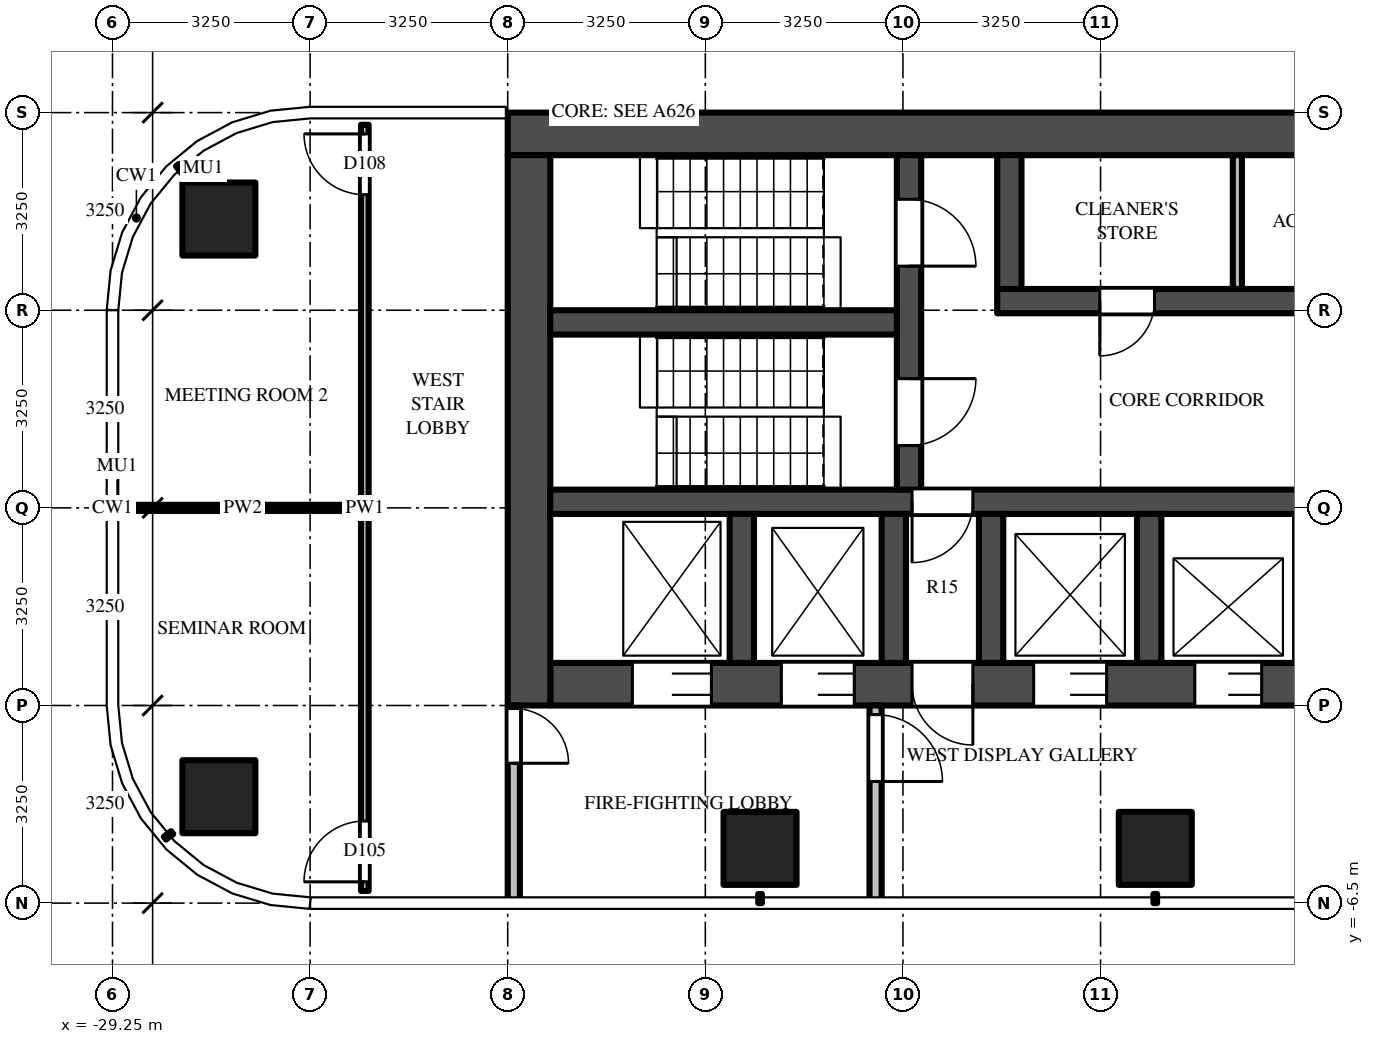
"""IFC4 building model, lengths in metres.
Left out: names, types, materials, properties, quantities, classifications, styles, units other than length and angle.
Written with IfcOpenShell. Run it as: python <this file> out.ifc"""

import sys

from ifc_helpers import new_model, si_unit, direction, frame, frame_2d, origin, origin_2d, place, context, subcontext, project, spatial, polyline, rectangle, outline, extrude, source, transform, mapped, element, fill, save


model = new_model("IFC4")
c1 = context("Model", 3, precision=1e-05, world=origin(), true_north=direction((0.0, 1.0)))
c2 = subcontext(c1, "Body", "Model", "MODEL_VIEW")
j1 = project(units=[si_unit("LENGTHUNIT", "METRE"), si_unit("PLANEANGLEUNIT", "RADIAN")], contexts=[c1])
p1 = place(None, origin())
s1 = spatial("IfcSite", under=j1, at=p1, CompositionType="ELEMENT")
p2 = place(p1, origin())
s2 = spatial("IfcBuilding", under=s1, at=p2, CompositionType="ELEMENT")
p3 = place(p2, frame((0.0, 0.0, 208.8)))
s3 = spatial("IfcBuildingStorey", under=s2, at=p3, CompositionType="ELEMENT", Elevation=208.8)
m1 = source(origin(), c2, "Body", "SweptSolid", [
    extrude(rectangle(XDim=1.2, YDim=1.2, at=origin_2d()), origin(), (0.0, 0.0, 1.0), 3.9),
])
for number, where, z_axis, x_axis in (
    (1, (-12.1, -5.6, 0.0), (0.0, 0.0, 1.0), (1.0, 0.0, 0.0)),
    (2, (-18.6, -5.6, 0.0), (0.0, 0.0, 1.0), (1.0, 0.0, 0.0)),
    (3, (-27.5, -4.75, 0.0), (0.0, 0.0, 1.0), (1.0, 0.0, 0.0)),
    (4, (-27.5, 4.75, 0.0), (0.0, 0.0, 1.0), (1.0, 0.0, 0.0)),
):
    element("IfcColumn", number, at=place(p3, frame(where, z_axis=z_axis, x_axis=x_axis)), inside=s3, PredefinedType="COLUMN", context=c2, shape_type="MappedRepresentation", body=[
        mapped(m1, transform((0.0, 0.0, 0.0))),
    ])
m2 = source(origin(), c2, "Body", "SweptSolid", [
    extrude(rectangle(XDim=16.55, YDim=0.7, at=frame_2d((8.275, 0.0))), origin(), (0.0, 0.0, 1.0), 3.45),
])
p4 = place(p3, frame((-6.2, 6.15, 0.0), z_axis=(0.0, 0.0, 1.0), x_axis=(-1.0, 0.0, 0.0)))
e5 = element("IfcWall", 5, at=p4, inside=s3, PredefinedType="SHEAR", context=c2, shape_type="MappedRepresentation", body=[
    mapped(m2, transform((0.0, 0.0, 0.0))),
])
m3 = source(origin(), c2, "Body", "SweptSolid", [
    extrude(rectangle(XDim=14.85, YDim=0.7, at=frame_2d((7.425, 0.0))), origin(), (0.0, 0.0, 1.0), 3.45),
])
p5 = place(p3, frame((-7.2, -2.9, 0.0), z_axis=(0.0, 0.0, 1.0), x_axis=(-1.0, 0.0, 0.0)))
e6 = element("IfcWall", 6, at=p5, inside=s3, PredefinedType="SHEAR", context=c2, shape_type="MappedRepresentation", body=[
    mapped(m3, transform((0.0, 0.0, 0.0))),
])
m4 = source(origin(), c2, "Body", "SweptSolid", [
    extrude(rectangle(XDim=1.1, YDim=2.1, at=frame_2d((0.55, 1.05))), frame((0.0, 0.36, 0.0), z_axis=(0.0, -1.0, 0.0), x_axis=(1.0, 0.0, 0.0)), (0.0, 0.0, 1.0), 0.72),
])
p6 = place(p5, frame((0.55, 0.0, 0.0)))
e7 = element("IfcOpeningElement", 7, at=p6, cuts=e6, PredefinedType="OPENING", context=c2, shape_type="MappedRepresentation", body=[
    mapped(m4, transform((0.0, 0.0, 0.0))),
])
p7 = place(p5, frame((3.15, 0.0, 0.0)))
e8 = element("IfcOpeningElement", 8, at=p7, cuts=e6, PredefinedType="OPENING", context=c2, shape_type="MappedRepresentation", body=[
    mapped(m4, transform((0.0, 0.0, 0.0))),
])
m5 = source(origin(), c2, "Body", "SweptSolid", [
    extrude(rectangle(XDim=1.2, YDim=2.1, at=frame_2d((0.6, 1.05))), frame((0.0, 0.36, 0.0), z_axis=(0.0, -1.0, 0.0), x_axis=(1.0, 0.0, 0.0)), (0.0, 0.0, 1.0), 0.72),
])
p8 = place(p5, frame((5.7, 0.0, 0.0)))
e9 = element("IfcOpeningElement", 9, at=p8, cuts=e6, PredefinedType="OPENING", context=c2, shape_type="MappedRepresentation", body=[
    mapped(m5, transform((0.0, 0.0, 0.0))),
])
m6 = source(origin(), c2, "Body", "SweptSolid", [
    extrude(rectangle(XDim=1.3, YDim=2.1, at=frame_2d((0.65, 1.05))), frame((0.0, 0.36, 0.0), z_axis=(0.0, -1.0, 0.0), x_axis=(1.0, 0.0, 0.0)), (0.0, 0.0, 1.0), 0.72),
])
p9 = place(p5, frame((12.2, 0.0, 0.0)))
e10 = element("IfcOpeningElement", 10, at=p9, cuts=e6, PredefinedType="OPENING", context=c2, shape_type="MappedRepresentation", body=[
    mapped(m6, transform((0.0, 0.0, 0.0))),
])
p10 = place(p5, frame((9.85, 0.0, 0.0)))
e11 = element("IfcOpeningElement", 11, at=p10, cuts=e6, PredefinedType="OPENING", context=c2, shape_type="MappedRepresentation", body=[
    mapped(m5, transform((0.0, 0.0, 0.0))),
])
m7 = source(origin(), c2, "Body", "SweptSolid", [
    extrude(rectangle(XDim=1.0, YDim=2.1, at=frame_2d((0.5, 1.05))), frame((0.0, 0.36, 0.0), z_axis=(0.0, -1.0, 0.0), x_axis=(1.0, 0.0, 0.0)), (0.0, 0.0, 1.0), 0.72),
])
p11 = place(p5, frame((7.9, 0.0, 0.0)))
e12 = element("IfcOpeningElement", 12, at=p11, cuts=e6, PredefinedType="OPENING", context=c2, shape_type="MappedRepresentation", body=[
    mapped(m7, transform((0.0, 0.0, 0.0))),
])
m8 = source(origin(), c2, "Body", "SweptSolid", [
    extrude(rectangle(XDim=9.05, YDim=0.7, at=frame_2d((4.525, 0.0))), origin(), (0.0, 0.0, 1.0), 3.45),
])
p12 = place(p3, frame((-22.4, 5.8, 0.0), z_axis=(0.0, 0.0, 1.0), x_axis=(0.0, -1.0, 0.0)))
e13 = element("IfcWall", 13, at=p12, inside=s3, PredefinedType="SHEAR", context=c2, shape_type="MappedRepresentation", body=[
    mapped(m8, transform((0.0, 0.0, 0.0))),
])
m9 = source(origin(), c2, "Body", "SweptSolid", [
    extrude(rectangle(XDim=7.5, YDim=0.4, at=frame_2d((3.75, 0.0))), origin(), (0.0, 0.0, 1.0), 3.45),
])
p13 = place(p3, frame((-7.2, 3.4, 0.0), z_axis=(0.0, 0.0, 1.0), x_axis=(-1.0, 0.0, 0.0)))
e14 = element("IfcWall", 14, at=p13, inside=s3, PredefinedType="SHEAR", context=c2, shape_type="MappedRepresentation", body=[
    mapped(m9, transform((0.0, 0.0, 0.0))),
])
m10 = source(origin(), c2, "Body", "SweptSolid", [
    extrude(rectangle(XDim=1.0, YDim=2.1, at=frame_2d((0.5, 1.05))), frame((0.0, 0.21, 0.0), z_axis=(0.0, -1.0, 0.0), x_axis=(1.0, 0.0, 0.0)), (0.0, 0.0, 1.0), 0.42),
])
p14 = place(p13, frame((1.238, 0.0, 0.0)))
e15 = element("IfcOpeningElement", 15, at=p14, cuts=e14, PredefinedType="OPENING", context=c2, shape_type="MappedRepresentation", body=[
    mapped(m10, transform((0.0, 0.0, 0.0))),
])
m11 = source(origin(), c2, "Body", "SweptSolid", [
    extrude(rectangle(XDim=0.9, YDim=2.1, at=frame_2d((0.45, 1.05))), frame((0.0, 0.21, 0.0), z_axis=(0.0, -1.0, 0.0), x_axis=(1.0, 0.0, 0.0)), (0.0, 0.0, 1.0), 0.42),
])
p15 = place(p13, frame((4.913, 0.0, 0.0)))
e16 = element("IfcOpeningElement", 16, at=p15, cuts=e14, PredefinedType="OPENING", context=c2, shape_type="MappedRepresentation", body=[
    mapped(m11, transform((0.0, 0.0, 0.0))),
])
m12 = source(origin(), c2, "Body", "SweptSolid", [
    extrude(rectangle(XDim=14.85, YDim=0.4, at=frame_2d((7.425, 0.0))), origin(), (0.0, 0.0, 1.0), 3.45),
])
p16 = place(p3, frame((-7.2, 0.1, 0.0), z_axis=(0.0, 0.0, 1.0), x_axis=(-1.0, 0.0, 0.0)))
e17 = element("IfcWall", 17, at=p16, inside=s3, PredefinedType="SHEAR", context=c2, shape_type="MappedRepresentation", body=[
    mapped(m12, transform((0.0, 0.0, 0.0))),
])
p17 = place(p16, frame((7.9, 0.0, 0.0)))
e18 = element("IfcOpeningElement", 18, at=p17, cuts=e17, PredefinedType="OPENING", context=c2, shape_type="MappedRepresentation", body=[
    mapped(m10, transform((0.0, 0.0, 0.0))),
])
m13 = source(origin(), c2, "Body", "SweptSolid", [
    extrude(rectangle(XDim=5.5, YDim=0.4, at=frame_2d((2.75, 0.0))), origin(), (0.0, 0.0, 1.0), 3.45),
])
p18 = place(p3, frame((-16.15, 5.8, 0.0), z_axis=(0.0, 0.0, 1.0), x_axis=(0.0, -1.0, 0.0)))
e19 = element("IfcWall", 19, at=p18, inside=s3, PredefinedType="SHEAR", context=c2, shape_type="MappedRepresentation", body=[
    mapped(m13, transform((0.0, 0.0, 0.0))),
])
m14 = source(origin(), c2, "Body", "SweptSolid", [
    extrude(rectangle(XDim=1.1, YDim=2.1, at=frame_2d((0.55, 1.05))), frame((0.0, 0.21, 0.0), z_axis=(0.0, -1.0, 0.0), x_axis=(1.0, 0.0, 0.0)), (0.0, 0.0, 1.0), 0.42),
])
p19 = place(p18, frame((0.725, 0.0, 0.0)))
e20 = element("IfcOpeningElement", 20, at=p19, cuts=e19, PredefinedType="OPENING", context=c2, shape_type="MappedRepresentation", body=[
    mapped(m14, transform((0.0, 0.0, 0.0))),
])
p20 = place(p18, frame((3.675, 0.0, 0.0)))
e21 = element("IfcOpeningElement", 21, at=p20, cuts=e19, PredefinedType="OPENING", context=c2, shape_type="MappedRepresentation", body=[
    mapped(m14, transform((0.0, 0.0, 0.0))),
])
m15 = source(origin(), c2, "Body", "SweptSolid", [
    extrude(rectangle(XDim=5.7, YDim=0.4, at=frame_2d((2.85, 0.0))), origin(), (0.0, 0.0, 1.0), 3.45),
])
p21 = place(p3, frame((-16.35, 3.05, 0.0), z_axis=(0.0, 0.0, 1.0), x_axis=(-1.0, 0.0, 0.0)))
e22 = element("IfcWall", 22, at=p21, inside=s3, PredefinedType="SHEAR", context=c2, shape_type="MappedRepresentation", body=[
    mapped(m15, transform((0.0, 0.0, 0.0))),
])
m16 = source(origin(), c2, "Body", "SweptSolid", [
    extrude(rectangle(XDim=2.2, YDim=0.4, at=frame_2d((1.1, 0.0))), origin(), (0.0, 0.0, 1.0), 3.45),
])
p22 = place(p3, frame((-14.5, 5.8, 0.0), z_axis=(0.0, 0.0, 1.0), x_axis=(0.0, -1.0, 0.0)))
e23 = element("IfcWall", 23, at=p22, inside=s3, PredefinedType="SHEAR", context=c2, shape_type="MappedRepresentation", body=[
    mapped(m16, transform((0.0, 0.0, 0.0))),
])
m17 = source(origin(), c2, "Body", "SweptSolid", [
    extrude(rectangle(XDim=2.45, YDim=0.4, at=frame_2d((1.225, 0.0))), origin(), (0.0, 0.0, 1.0), 3.45),
])
for number, where, z_axis, x_axis in (
    (24, (-12.2, -0.1, 0.0), (0.0, 0.0, 1.0), (0.0, -1.0, 0.0)),
    (25, (-14.8, -0.1, 0.0), (0.0, 0.0, 1.0), (0.0, -1.0, 0.0)),
    (26, (-16.4, -0.1, 0.0), (0.0, 0.0, 1.0), (0.0, -1.0, 0.0)),
    (27, (-18.9, -0.1, 0.0), (0.0, 0.0, 1.0), (0.0, -1.0, 0.0)),
):
    element("IfcWall", number, at=place(p3, frame(where, z_axis=z_axis, x_axis=x_axis)), inside=s3, PredefinedType="SHEAR", context=c2, shape_type="MappedRepresentation", body=[
        mapped(m17, transform((0.0, 0.0, 0.0))),
    ])
m18 = source(origin(), c2, "Body", "SweptSolid", [
    extrude(rectangle(XDim=3.25, YDim=0.2, at=frame_2d((1.625, 0.0))), origin(), (0.0, 0.0, 1.0), 3.45),
])
p23 = place(p3, frame((-16.7, -3.25, 0.0), z_axis=(0.0, 0.0, 1.0), x_axis=(0.0, -1.0, 0.0)))
e28 = element("IfcWall", 28, at=p23, inside=s3, PredefinedType="PARTITIONING", context=c2, shape_type="MappedRepresentation", body=[
    mapped(m18, transform((0.0, 0.0, 0.0))),
])
m19 = source(origin(), c2, "Body", "SweptSolid", [
    extrude(rectangle(XDim=1.1, YDim=2.1, at=frame_2d((0.55, 1.05))), frame((0.0, 0.11, 0.0), z_axis=(0.0, -1.0, 0.0), x_axis=(1.0, 0.0, 0.0)), (0.0, 0.0, 1.0), 0.22),
])
p24 = place(p23, frame((0.15, 0.0, 0.0)))
e29 = element("IfcOpeningElement", 29, at=p24, cuts=e28, PredefinedType="OPENING", context=c2, shape_type="MappedRepresentation", body=[
    mapped(m19, transform((0.0, 0.0, 0.0))),
])
p25 = place(p3, frame((-22.65, -3.25, 0.0), z_axis=(0.0, 0.0, 1.0), x_axis=(0.0, -1.0, 0.0)))
e30 = element("IfcWall", 30, at=p25, inside=s3, PredefinedType="PARTITIONING", context=c2, shape_type="MappedRepresentation", body=[
    mapped(m18, transform((0.0, 0.0, 0.0))),
])
m20 = source(origin(), c2, "Body", "SweptSolid", [
    extrude(rectangle(XDim=0.9, YDim=2.1, at=frame_2d((0.45, 1.05))), frame((0.0, 0.11, 0.0), z_axis=(0.0, -1.0, 0.0), x_axis=(1.0, 0.0, 0.0)), (0.0, 0.0, 1.0), 0.22),
])
p26 = place(p25, frame((0.05, 0.0, 0.0)))
e31 = element("IfcOpeningElement", 31, at=p26, cuts=e30, PredefinedType="OPENING", context=c2, shape_type="MappedRepresentation", body=[
    mapped(m20, transform((0.0, 0.0, 0.0))),
])
m21 = source(origin(), c2, "Body", "SweptSolid", [
    extrude(rectangle(XDim=2.2, YDim=0.15, at=frame_2d((1.1, 0.0))), origin(), (0.0, 0.0, 1.0), 3.45),
])
p27 = place(p3, frame((-10.75, 5.8, 0.0), z_axis=(0.0, 0.0, 1.0), x_axis=(0.0, -1.0, 0.0)))
e32 = element("IfcWall", 32, at=p27, inside=s3, PredefinedType="PARTITIONING", context=c2, shape_type="MappedRepresentation", body=[
    mapped(m21, transform((0.0, 0.0, 0.0))),
])
p28 = place(p3, origin())
e33 = element("IfcWall", 33, at=p28, inside=s3, PredefinedType="USERDEFINED", context=c2, shape_type="SweptSolid", body=[
    extrude(outline(polyline([(-26.967, -8.775), (-28.595, -8.198), (-29.254, -7.586), (-28.846, -7.146), (-28.278, -7.674), (-26.87, -8.173), (-25.765, -8.148), (-25.642, -8.112), (-25.472, -8.688), (-25.672, -8.747), (-26.967, -8.775)])), origin(), (0.0, 0.0, 1.0), 0.5),
])
m22 = source(origin(), c2, "Body", "SweptSolid", [
    extrude(rectangle(XDim=12.6, YDim=0.125, at=frame_2d((6.3, 0.0))), origin(), (0.0, 0.0, 1.0), 2.53),
])
p29 = place(p3, frame((-25.1, -6.3, 0.0), z_axis=(0.0, 0.0, 1.0), x_axis=(0.0, 1.0, 0.0)))
e34 = element("IfcWall", 34, at=p29, inside=s3, PredefinedType="PARTITIONING", context=c2, shape_type="MappedRepresentation", body=[
    mapped(m22, transform((0.0, 0.0, 0.0))),
])
m23 = source(origin(), c2, "Body", "SweptSolid", [
    extrude(rectangle(XDim=1.0, YDim=2.1, at=frame_2d((0.5, 1.05))), frame((0.0, 0.073, 0.0), z_axis=(0.0, -1.0, 0.0), x_axis=(1.0, 0.0, 0.0)), (0.0, 0.0, 1.0), 0.145),
])
p30 = place(p29, frame((0.15, 0.0, 0.0)))
e35 = element("IfcOpeningElement", 35, at=p30, cuts=e34, PredefinedType="OPENING", context=c2, shape_type="MappedRepresentation", body=[
    mapped(m23, transform((0.0, 0.0, 0.0))),
])
p31 = place(p29, frame((11.45, 0.0, 0.0)))
e36 = element("IfcOpeningElement", 36, at=p31, cuts=e34, PredefinedType="OPENING", context=c2, shape_type="MappedRepresentation", body=[
    mapped(m23, transform((0.0, 0.0, 0.0))),
])
m24 = source(origin(), c2, "Body", "SweptSolid", [
    extrude(rectangle(XDim=3.887, YDim=0.1, at=frame_2d((1.944, 0.0))), origin(), (0.0, 0.0, 1.0), 2.53),
])
p32 = place(p3, frame((-29.05, 0.0, 0.0), z_axis=(0.0, 0.0, 1.0), x_axis=(1.0, 0.0, 0.0)))
e37 = element("IfcWall", 37, at=p32, inside=s3, PredefinedType="PARTITIONING", context=c2, shape_type="MappedRepresentation", body=[
    mapped(m24, transform((0.0, 0.0, 0.0))),
])
m25 = source(origin(), c2, "Body", "SweptSolid", [
    extrude(rectangle(XDim=1.1, YDim=2.1, at=frame_2d((0.55, 1.05))), frame((0.0, -0.275, 0.0), z_axis=(0.0, -1.0, 0.0), x_axis=(1.0, 0.0, 0.0)), (0.0, 0.0, 1.0), 0.05),
])
p33 = place(p7, origin())
e38 = element("IfcDoor", 38, at=p33, inside=s3, OperationType="DOUBLE_DOOR_SLIDING", PredefinedType="DOOR", context=c2, shape_type="MappedRepresentation", body=[
    mapped(m25, transform((0.0, 0.0, 0.0))),
])
fill(e8, e38)
m26 = source(origin(), c2, "Body", "SweptSolid", [
    extrude(rectangle(XDim=1.2, YDim=2.1, at=frame_2d((0.6, 1.05))), frame((0.0, -0.275, 0.0), z_axis=(0.0, -1.0, 0.0), x_axis=(1.0, 0.0, 0.0)), (0.0, 0.0, 1.0), 0.05),
])
p34 = place(p8, origin())
e39 = element("IfcDoor", 39, at=p34, inside=s3, OperationType="DOUBLE_DOOR_SLIDING", PredefinedType="DOOR", context=c2, shape_type="MappedRepresentation", body=[
    mapped(m26, transform((0.0, 0.0, 0.0))),
])
fill(e9, e39)
m27 = source(origin(), c2, "Body", "SweptSolid", [
    extrude(rectangle(XDim=1.3, YDim=2.1, at=frame_2d((0.65, 1.05))), frame((0.0, -0.275, 0.0), z_axis=(0.0, -1.0, 0.0), x_axis=(1.0, 0.0, 0.0)), (0.0, 0.0, 1.0), 0.05),
])
p35 = place(p9, origin())
e40 = element("IfcDoor", 40, at=p35, inside=s3, OperationType="DOUBLE_DOOR_SLIDING", PredefinedType="DOOR", context=c2, shape_type="MappedRepresentation", body=[
    mapped(m27, transform((0.0, 0.0, 0.0))),
])
fill(e10, e40)
p36 = place(p10, origin())
e41 = element("IfcDoor", 41, at=p36, inside=s3, OperationType="DOUBLE_DOOR_SLIDING", PredefinedType="DOOR", context=c2, shape_type="MappedRepresentation", body=[
    mapped(m26, transform((0.0, 0.0, 0.0))),
])
fill(e11, e41)
m28 = source(origin(), c2, "Body", "SweptSolid", [
    extrude(rectangle(XDim=1.1, YDim=2.1, at=frame_2d((0.55, 1.05))), frame((0.0, 0.025, 0.0), z_axis=(0.0, -1.0, 0.0), x_axis=(1.0, 0.0, 0.0)), (0.0, 0.0, 1.0), 0.05),
])
p37 = place(p19, origin())
e42 = element("IfcDoor", 42, at=p37, inside=s3, OperationType="SINGLE_SWING_RIGHT", PredefinedType="DOOR", context=c2, shape_type="MappedRepresentation", body=[
    mapped(m28, transform((0.0, 0.0, 0.0))),
])
fill(e20, e42)
p38 = place(p20, origin())
e43 = element("IfcDoor", 43, at=p38, inside=s3, OperationType="SINGLE_SWING_LEFT", PredefinedType="DOOR", context=c2, shape_type="MappedRepresentation", body=[
    mapped(m28, transform((0.0, 0.0, 0.0))),
])
fill(e21, e43)
m29 = source(origin(), c2, "Body", "SweptSolid", [
    extrude(rectangle(XDim=1.0, YDim=2.1, at=frame_2d((0.5, 1.05))), frame((0.0, 0.025, 0.0), z_axis=(0.0, -1.0, 0.0), x_axis=(1.0, 0.0, 0.0)), (0.0, 0.0, 1.0), 0.05),
])
p39 = place(p17, origin())
e44 = element("IfcDoor", 44, at=p39, inside=s3, OperationType="SINGLE_SWING_RIGHT", PredefinedType="DOOR", context=c2, shape_type="MappedRepresentation", body=[
    mapped(m29, transform((0.0, 0.0, 0.0))),
])
fill(e18, e44)
m30 = source(origin(), c2, "Body", "SweptSolid", [
    extrude(rectangle(XDim=1.0, YDim=2.1, at=frame_2d((0.5, 1.05))), frame((0.0, -0.275, 0.0), z_axis=(0.0, -1.0, 0.0), x_axis=(1.0, 0.0, 0.0)), (0.0, 0.0, 1.0), 0.05),
])
p40 = place(p11, origin())
e45 = element("IfcDoor", 45, at=p40, inside=s3, OperationType="SINGLE_SWING_LEFT", PredefinedType="DOOR", context=c2, shape_type="MappedRepresentation", body=[
    mapped(m30, transform((0.0, 0.0, 0.0))),
])
fill(e12, e45)
p41 = place(p24, origin())
e46 = element("IfcDoor", 46, at=p41, inside=s3, OperationType="SINGLE_SWING_RIGHT", PredefinedType="DOOR", context=c2, shape_type="MappedRepresentation", body=[
    mapped(m28, transform((0.0, 0.0, 0.0))),
])
fill(e29, e46)
m31 = source(origin(), c2, "Body", "SweptSolid", [
    extrude(rectangle(XDim=0.9, YDim=2.1, at=frame_2d((0.45, 1.05))), frame((0.0, 0.025, 0.0), z_axis=(0.0, -1.0, 0.0), x_axis=(1.0, 0.0, 0.0)), (0.0, 0.0, 1.0), 0.05),
])
p42 = place(p26, origin())
e47 = element("IfcDoor", 47, at=p42, inside=s3, OperationType="SINGLE_SWING_RIGHT", PredefinedType="DOOR", context=c2, shape_type="MappedRepresentation", body=[
    mapped(m31, transform((0.0, 0.0, 0.0))),
])
fill(e31, e47)
p43 = place(p15, origin())
e48 = element("IfcDoor", 48, at=p43, inside=s3, OperationType="SINGLE_SWING_RIGHT", PredefinedType="DOOR", context=c2, shape_type="MappedRepresentation", body=[
    mapped(m31, transform((0.0, 0.0, 0.0))),
])
fill(e16, e48)
p44 = place(p30, origin())
e49 = element("IfcDoor", 49, at=p44, inside=s3, OperationType="SINGLE_SWING_LEFT", PredefinedType="DOOR", context=c2, shape_type="MappedRepresentation", body=[
    mapped(m29, transform((0.0, 0.0, 0.0))),
])
fill(e35, e49)
p45 = place(p31, origin())
e50 = element("IfcDoor", 50, at=p45, inside=s3, OperationType="SINGLE_SWING_RIGHT", PredefinedType="DOOR", context=c2, shape_type="MappedRepresentation", body=[
    mapped(m29, transform((0.0, 0.0, 0.0))),
])
fill(e36, e50)
save(model, sys.argv[1])
